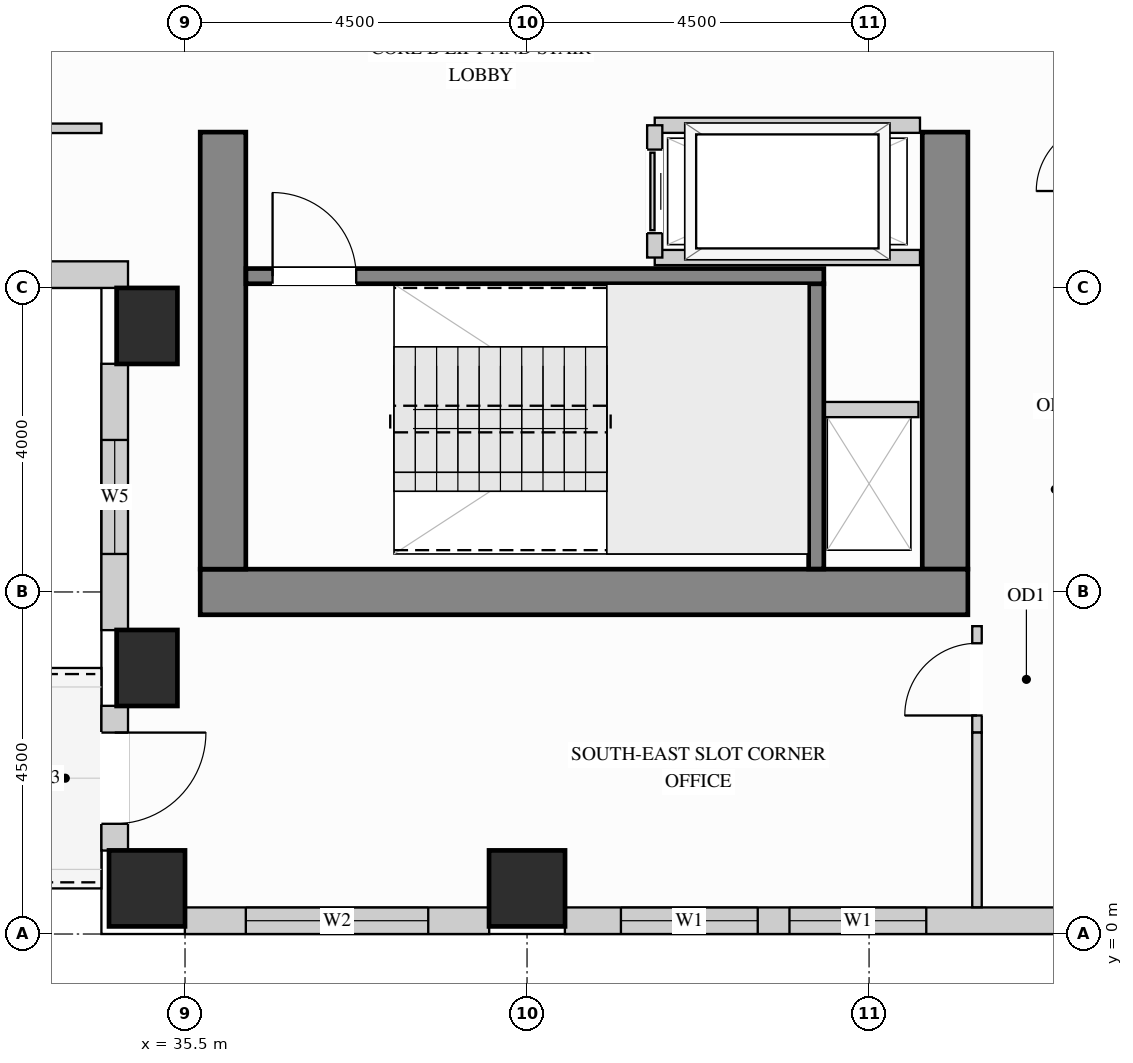
"""IFC4 building model, lengths in metres.
Left out: names, types, materials, properties, quantities, classifications, styles, units other than length and angle.
Written with IfcOpenShell. Run it as: python <this file> out.ifc"""

import sys

from ifc_helpers import new_model, si_unit, direction, frame, frame_2d, origin, origin_2d, place, context, subcontext, project, spatial, rectangle, extrude, source, transform, mapped, element, fill, save


model = new_model("IFC4")
c1 = context("Model", 3, precision=1e-05, world=origin(), true_north=direction((0.0, 1.0)))
c2 = subcontext(c1, "Body", "Model", "MODEL_VIEW")
j1 = project(units=[si_unit("LENGTHUNIT", "METRE"), si_unit("PLANEANGLEUNIT", "RADIAN")], contexts=[c1])
p1 = place(None, origin())
s1 = spatial("IfcSite", under=j1, at=p1, CompositionType="ELEMENT")
p2 = place(p1, origin())
s2 = spatial("IfcBuilding", under=s1, at=p2, CompositionType="ELEMENT")
p3 = place(p2, frame((0.0, 0.0, 193.5)))
s3 = spatial("IfcBuildingStorey", under=s2, at=p3, CompositionType="ELEMENT", Elevation=193.5)
m1 = source(origin(), c2, "Body", "SweptSolid", [
    extrude(rectangle(XDim=0.8, YDim=1.0, at=origin_2d()), origin(), (0.0, 0.0, 1.0), 3.4),
])
for number, where, z_axis, x_axis in (
    (1, (35.0, 3.5, 0.0), (0.0, 0.0, 1.0), (1.0, 0.0, 0.0)),
    (2, (35.0, 8.0, 0.0), (0.0, 0.0, 1.0), (1.0, 0.0, 0.0)),
):
    element("IfcColumn", number, at=place(p3, frame(where, z_axis=z_axis, x_axis=x_axis)), inside=s3, PredefinedType="COLUMN", context=c2, shape_type="MappedRepresentation", body=[
        mapped(m1, transform((0.0, 0.0, 0.0), x_axis=(1.0, 0.0, 0.0), y_axis=(0.0, 1.0, 0.0), z_axis=(0.0, 0.0, 1.0))),
    ])
m2 = source(origin(), c2, "Body", "SweptSolid", [
    extrude(rectangle(XDim=1.0, YDim=1.0, at=origin_2d()), origin(), (0.0, 0.0, 1.0), 3.4),
])
for number, where, z_axis, x_axis in (
    (3, (35.0, 0.6, 0.0), (0.0, 0.0, 1.0), (1.0, 0.0, 0.0)),
    (4, (40.0, 0.6, 0.0), (0.0, 0.0, 1.0), (1.0, 0.0, 0.0)),
):
    element("IfcColumn", number, at=place(p3, frame(where, z_axis=z_axis, x_axis=x_axis)), inside=s3, PredefinedType="COLUMN", context=c2, shape_type="MappedRepresentation", body=[
        mapped(m2, transform((0.0, 0.0, 0.0), x_axis=(1.0, 0.0, 0.0), y_axis=(0.0, 1.0, 0.0), z_axis=(0.0, 0.0, 1.0))),
    ])
m3 = source(origin(), c2, "Body", "SweptSolid", [
    extrude(rectangle(XDim=5.75, YDim=0.6, at=frame_2d((2.875, 0.0))), origin(), (0.0, 0.0, 1.0), 3.4),
])
p4 = place(p3, frame((45.5, 4.8, 0.0), z_axis=(0.0, 0.0, 1.0), x_axis=(0.0, 1.0, 0.0)))
e5 = element("IfcWall", 5, at=p4, inside=s3, PredefinedType="SHEAR", context=c2, shape_type="MappedRepresentation", body=[
    mapped(m3, transform((0.0, 0.0, 0.0), x_axis=(1.0, 0.0, 0.0), y_axis=(0.0, 1.0, 0.0), z_axis=(0.0, 0.0, 1.0))),
])
m4 = source(origin(), c2, "Body", "SweptSolid", [
    extrude(rectangle(XDim=10.1, YDim=0.6, at=frame_2d((5.05, 0.0))), origin(), (0.0, 0.0, 1.0), 3.4),
])
p5 = place(p3, frame((35.7, 4.5, 0.0), z_axis=(0.0, 0.0, 1.0), x_axis=(1.0, 0.0, 0.0)))
e6 = element("IfcWall", 6, at=p5, inside=s3, PredefinedType="SHEAR", context=c2, shape_type="MappedRepresentation", body=[
    mapped(m4, transform((0.0, 0.0, 0.0), x_axis=(1.0, 0.0, 0.0), y_axis=(0.0, 1.0, 0.0), z_axis=(0.0, 0.0, 1.0))),
])
p6 = place(p3, frame((36.0, 4.8, 0.0), z_axis=(0.0, 0.0, 1.0), x_axis=(0.0, 1.0, 0.0)))
e7 = element("IfcWall", 7, at=p6, inside=s3, PredefinedType="SHEAR", context=c2, shape_type="MappedRepresentation", body=[
    mapped(m3, transform((0.0, 0.0, 0.0), x_axis=(1.0, 0.0, 0.0), y_axis=(0.0, 1.0, 0.0), z_axis=(0.0, 0.0, 1.0))),
])
p7 = place(p3, frame((30.898, 8.675, 0.0), z_axis=(0.0, 0.0, 1.0), x_axis=(1.0, 0.0, 0.0)))
e8 = element("IfcWall", 8, at=p7, inside=s3, PredefinedType="SOLIDWALL", context=c2, shape_type="SweptSolid", body=[
    extrude(rectangle(XDim=3.852, YDim=0.35, at=frame_2d((1.926, 0.0))), origin(), (0.0, 0.0, 1.0), 3.385),
])
p8 = place(p7, frame((1.176, 0.0, 0.78)))
e9 = element("IfcOpeningElement", 9, at=p8, cuts=e8, PredefinedType="OPENING", context=c2, shape_type="SweptSolid", body=[
    extrude(rectangle(XDim=1.5, YDim=2.0, at=frame_2d((0.75, 1.0))), frame((0.0, 0.185, 0.0), z_axis=(0.0, -1.0, 0.0), x_axis=(1.0, 0.0, 0.0)), (0.0, 0.0, 1.0), 0.37),
])
p9 = place(p3, frame((34.575, 7.502, 0.0), z_axis=(0.0, 0.0, 1.0), x_axis=(0.0, -1.0, 0.0)))
e10 = element("IfcWall", 10, at=p9, inside=s3, PredefinedType="SOLIDWALL", context=c2, shape_type="SweptSolid", body=[
    extrude(rectangle(XDim=3.504, YDim=0.35, at=frame_2d((1.752, 0.0))), origin(), (0.0, 0.0, 1.0), 2.612),
])
p10 = place(p9, frame((1.002, 0.0, 0.78)))
e11 = element("IfcOpeningElement", 11, at=p10, cuts=e10, PredefinedType="OPENING", context=c2, shape_type="SweptSolid", body=[
    extrude(rectangle(XDim=1.5, YDim=1.652, at=frame_2d((0.75, 0.826))), frame((0.0, 0.185, 0.0), z_axis=(0.0, -1.0, 0.0), x_axis=(1.0, 0.0, 0.0)), (0.0, 0.0, 1.0), 0.37),
])
p11 = place(p3, frame((34.575, 3.002, 0.0), z_axis=(0.0, 0.0, 1.0), x_axis=(0.0, -1.0, 0.0)))
e12 = element("IfcWall", 12, at=p11, inside=s3, PredefinedType="SOLIDWALL", context=c2, shape_type="SweptSolid", body=[
    extrude(rectangle(XDim=1.904, YDim=0.35, at=frame_2d((0.952, 0.0))), origin(), (0.0, 0.0, 1.0), 2.612),
])
p12 = place(p11, frame((0.352, 0.0, 0.0)))
e13 = element("IfcOpeningElement", 13, at=p12, cuts=e12, PredefinedType="OPENING", context=c2, shape_type="SweptSolid", body=[
    extrude(rectangle(XDim=1.2, YDim=2.15, at=frame_2d((0.6, 1.075))), frame((0.0, 0.185, 0.0), z_axis=(0.0, -1.0, 0.0), x_axis=(1.0, 0.0, 0.0)), (0.0, 0.0, 1.0), 0.37),
])
p13 = place(p3, frame((35.498, 0.175, 0.0), z_axis=(0.0, 0.0, 1.0), x_axis=(1.0, 0.0, 0.0)))
e14 = element("IfcWall", 14, at=p13, inside=s3, PredefinedType="SOLIDWALL", context=c2, shape_type="SweptSolid", body=[
    extrude(rectangle(XDim=4.004, YDim=0.35, at=frame_2d((2.002, 0.0))), origin(), (0.0, 0.0, 1.0), 2.612),
])
p14 = place(p13, frame((0.802, 0.0, 0.78)))
e15 = element("IfcOpeningElement", 15, at=p14, cuts=e14, PredefinedType="OPENING", context=c2, shape_type="SweptSolid", body=[
    extrude(rectangle(XDim=2.4, YDim=1.652, at=frame_2d((1.2, 0.826))), frame((0.0, 0.185, 0.0), z_axis=(0.0, -1.0, 0.0), x_axis=(1.0, 0.0, 0.0)), (0.0, 0.0, 1.0), 0.37),
])
p15 = place(p3, frame((40.498, 0.175, 0.0), z_axis=(0.0, 0.0, 1.0), x_axis=(1.0, 0.0, 0.0)))
e16 = element("IfcWall", 16, at=p15, inside=s3, PredefinedType="SOLIDWALL", context=c2, shape_type="SweptSolid", body=[
    extrude(rectangle(XDim=6.604, YDim=0.35, at=frame_2d((3.302, 0.0))), origin(), (0.0, 0.0, 1.0), 2.612),
])
p16 = place(p15, frame((0.737, 0.0, 0.78)))
e17 = element("IfcOpeningElement", 17, at=p16, cuts=e16, PredefinedType="OPENING", context=c2, shape_type="SweptSolid", body=[
    extrude(rectangle(XDim=1.8, YDim=1.652, at=frame_2d((0.9, 0.826))), frame((0.0, 0.185, 0.0), z_axis=(0.0, -1.0, 0.0), x_axis=(1.0, 0.0, 0.0)), (0.0, 0.0, 1.0), 0.37),
])
p17 = place(p15, frame((2.955, 0.0, 0.78)))
e18 = element("IfcOpeningElement", 18, at=p17, cuts=e16, PredefinedType="OPENING", context=c2, shape_type="SweptSolid", body=[
    extrude(rectangle(XDim=1.8, YDim=1.652, at=frame_2d((0.9, 0.826))), frame((0.0, 0.185, 0.0), z_axis=(0.0, -1.0, 0.0), x_axis=(1.0, 0.0, 0.0)), (0.0, 0.0, 1.0), 0.37),
])
p18 = place(p3, frame((45.92, 2.65, 0.0), z_axis=(0.0, 0.0, 1.0), x_axis=(0.0, 1.0, 0.0)))
e19 = element("IfcWall", 19, at=p18, inside=s3, PredefinedType="PARTITIONING", context=c2, shape_type="SweptSolid", body=[
    extrude(rectangle(XDim=1.4, YDim=0.125, at=frame_2d((0.7, 0.0))), origin(), (0.0, 0.0, 1.0), 3.385),
])
p19 = place(p18, frame((0.225, 0.0, 0.0)))
e20 = element("IfcOpeningElement", 20, at=p19, cuts=e19, PredefinedType="OPENING", context=c2, shape_type="SweptSolid", body=[
    extrude(rectangle(XDim=0.95, YDim=2.15, at=frame_2d((0.475, 1.075))), frame((0.0, 0.073, 0.0), z_axis=(0.0, -1.0, 0.0), x_axis=(1.0, 0.0, 0.0)), (0.0, 0.0, 1.0), 0.145),
])
m5 = source(origin(), c2, "Body", "SweptSolid", [
    extrude(rectangle(XDim=2.298, YDim=0.125, at=frame_2d((1.149, 0.0))), origin(), (0.0, 0.0, 1.0), 3.385),
])
p20 = place(p3, frame((45.92, 0.352, 0.0), z_axis=(0.0, 0.0, 1.0), x_axis=(0.0, 1.0, 0.0)))
e21 = element("IfcWall", 21, at=p20, inside=s3, PredefinedType="PARTITIONING", context=c2, shape_type="MappedRepresentation", body=[
    mapped(m5, transform((0.0, 0.0, 0.0), x_axis=(1.0, 0.0, 0.0), y_axis=(0.0, 1.0, 0.0), z_axis=(0.0, 0.0, 1.0))),
])
p21 = place(p3, frame((19.5, 10.6, 0.0), z_axis=(0.0, 0.0, 1.0), x_axis=(1.0, 0.0, 0.0)))
e22 = element("IfcWall", 22, at=p21, inside=s3, PredefinedType="PARTITIONING", context=c2, shape_type="SweptSolid", body=[
    extrude(rectangle(XDim=14.9, YDim=0.125, at=frame_2d((7.45, 0.0))), origin(), (0.0, 0.0, 1.0), 3.385),
])
p22 = place(p21, frame((6.975, 0.0, 0.0)))
e23 = element("IfcOpeningElement", 23, at=p22, cuts=e22, PredefinedType="OPENING", context=c2, shape_type="SweptSolid", body=[
    extrude(rectangle(XDim=0.95, YDim=2.15, at=frame_2d((0.475, 1.075))), frame((0.0, 0.073, 0.0), z_axis=(0.0, -1.0, 0.0), x_axis=(1.0, 0.0, 0.0)), (0.0, 0.0, 1.0), 0.145),
])
m6 = source(origin(), c2, "Body", "SweptSolid", [
    extrude(rectangle(XDim=1.3, YDim=0.2, at=frame_2d((0.65, 0.0))), origin(), (0.0, 0.0, 1.0), 3.385),
])
p23 = place(p3, frame((43.85, 6.9, 0.0), z_axis=(0.0, 0.0, 1.0), x_axis=(1.0, 0.0, 0.0)))
e24 = element("IfcWall", 24, at=p23, inside=s3, PredefinedType="PARTITIONING", context=c2, shape_type="MappedRepresentation", body=[
    mapped(m6, transform((0.0, 0.0, 0.0), x_axis=(1.0, 0.0, 0.0), y_axis=(0.0, 1.0, 0.0), z_axis=(0.0, 0.0, 1.0))),
])
m7 = source(origin(), c2, "Body", "SweptSolid", [
    extrude(rectangle(XDim=3.49, YDim=0.2, at=frame_2d((1.745, 0.0))), origin(), (0.0, 0.0, 1.0), 3.385),
])
for number, where, z_axis, x_axis in (
    (25, (41.68, 10.64, 0.0), (0.0, 0.0, 1.0), (1.0, 0.0, 0.0)),
    (26, (41.68, 8.9, 0.0), (0.0, 0.0, 1.0), (1.0, 0.0, 0.0)),
):
    element("IfcWall", number, at=place(p3, frame(where, z_axis=z_axis, x_axis=x_axis)), inside=s3, PredefinedType="PARTITIONING", context=c2, shape_type="MappedRepresentation", body=[
        mapped(m7, transform((0.0, 0.0, 0.0), x_axis=(1.0, 0.0, 0.0), y_axis=(0.0, 1.0, 0.0), z_axis=(0.0, 0.0, 1.0))),
    ])
p24 = place(p3, frame((41.68, 8.9, 0.0), z_axis=(0.0, 0.0, 1.0), x_axis=(0.0, 1.0, 0.0)))
e27 = element("IfcWall", 27, at=p24, inside=s3, PredefinedType="PARTITIONING", context=c2, shape_type="SweptSolid", body=[
    extrude(rectangle(XDim=1.74, YDim=0.2, at=frame_2d((0.87, 0.0))), origin(), (0.0, 0.0, 1.0), 3.385),
])
p25 = place(p24, frame((0.32, 0.0, 0.0)))
e28 = element("IfcOpeningElement", 28, at=p25, cuts=e27, PredefinedType="OPENING", context=c2, shape_type="SweptSolid", body=[
    extrude(rectangle(XDim=1.1, YDim=2.2, at=frame_2d((0.55, 1.1))), frame((0.0, 0.11, 0.0), z_axis=(0.0, -1.0, 0.0), x_axis=(1.0, 0.0, 0.0)), (0.0, 0.0, 1.0), 0.22),
])
m8 = source(origin(), c2, "Body", "SweptSolid", [
    extrude(rectangle(XDim=3.753, YDim=0.2, at=frame_2d((1.876, 0.0))), origin(), (0.0, 0.0, 1.0), 3.4),
])
p26 = place(p3, frame((43.805, 4.802, 0.0), z_axis=(0.0, 0.0, 1.0), x_axis=(0.0, 1.0, 0.0)))
e29 = element("IfcWall", 29, at=p26, inside=s3, PredefinedType="SHEAR", context=c2, shape_type="MappedRepresentation", body=[
    mapped(m8, transform((0.0, 0.0, 0.0), x_axis=(1.0, 0.0, 0.0), y_axis=(0.0, 1.0, 0.0), z_axis=(0.0, 0.0, 1.0))),
])
p27 = place(p3, frame((36.302, 8.655, 0.0), z_axis=(0.0, 0.0, 1.0), x_axis=(1.0, 0.0, 0.0)))
e30 = element("IfcWall", 30, at=p27, inside=s3, PredefinedType="SHEAR", context=c2, shape_type="SweptSolid", body=[
    extrude(rectangle(XDim=7.603, YDim=0.2, at=frame_2d((3.802, 0.0))), origin(), (0.0, 0.0, 1.0), 3.4),
])
p28 = place(p27, frame((0.35, 0.0, 0.0)))
e31 = element("IfcOpeningElement", 31, at=p28, cuts=e30, PredefinedType="OPENING", context=c2, shape_type="SweptSolid", body=[
    extrude(rectangle(XDim=1.1, YDim=2.15, at=frame_2d((0.55, 1.075))), frame((0.0, 0.11, 0.0), z_axis=(0.0, -1.0, 0.0), x_axis=(1.0, 0.0, 0.0)), (0.0, 0.0, 1.0), 0.22),
])
m9 = source(origin(), c2, "Body", "SweptSolid", [
    extrude(rectangle(XDim=1.2, YDim=2.15, at=frame_2d((0.6, 1.075))), frame((0.0, 0.025, 0.0), z_axis=(0.0, -1.0, 0.0), x_axis=(1.0, 0.0, 0.0)), (0.0, 0.0, 1.0), 0.05),
])
p29 = place(p12, frame((1.2, 0.0, 0.0), z_axis=(0.0, 0.0, 1.0), x_axis=(-1.0, 0.0, 0.0)))
e32 = element("IfcDoor", 32, at=p29, inside=s3, OperationType="SINGLE_SWING_LEFT", PredefinedType="DOOR", context=c2, shape_type="MappedRepresentation", body=[
    mapped(m9, transform((0.0, 0.0, 0.0), x_axis=(1.0, 0.0, 0.0), y_axis=(0.0, 1.0, 0.0), z_axis=(0.0, 0.0, 1.0))),
])
fill(e13, e32)
m10 = source(origin(), c2, "Body", "SweptSolid", [
    extrude(rectangle(XDim=1.1, YDim=2.2, at=frame_2d((0.55, 1.1))), frame((0.0, 0.025, 0.0), z_axis=(0.0, -1.0, 0.0), x_axis=(1.0, 0.0, 0.0)), (0.0, 0.0, 1.0), 0.05),
])
p30 = place(p25, origin())
e33 = element("IfcDoor", 33, at=p30, inside=s3, OperationType="SLIDING_TO_LEFT", PredefinedType="DOOR", context=c2, shape_type="MappedRepresentation", body=[
    mapped(m10, transform((0.0, 0.0, 0.0), x_axis=(1.0, 0.0, 0.0), y_axis=(0.0, 1.0, 0.0), z_axis=(0.0, 0.0, 1.0))),
])
fill(e28, e33)
m11 = source(origin(), c2, "Body", "SweptSolid", [
    extrude(rectangle(XDim=0.95, YDim=2.15, at=frame_2d((0.475, 1.075))), frame((0.0, 0.025, 0.0), z_axis=(0.0, -1.0, 0.0), x_axis=(1.0, 0.0, 0.0)), (0.0, 0.0, 1.0), 0.05),
])
p31 = place(p19, origin())
e34 = element("IfcDoor", 34, at=p31, inside=s3, OperationType="SINGLE_SWING_LEFT", PredefinedType="DOOR", context=c2, shape_type="MappedRepresentation", body=[
    mapped(m11, transform((0.0, 0.0, 0.0), x_axis=(1.0, 0.0, 0.0), y_axis=(0.0, 1.0, 0.0), z_axis=(0.0, 0.0, 1.0))),
])
fill(e20, e34)
m12 = source(origin(), c2, "Body", "SweptSolid", [
    extrude(rectangle(XDim=1.1, YDim=2.15, at=frame_2d((0.55, 1.075))), frame((0.0, 0.025, 0.0), z_axis=(0.0, -1.0, 0.0), x_axis=(1.0, 0.0, 0.0)), (0.0, 0.0, 1.0), 0.05),
])
p32 = place(p28, origin())
e35 = element("IfcDoor", 35, at=p32, inside=s3, OperationType="SINGLE_SWING_LEFT", PredefinedType="DOOR", context=c2, shape_type="MappedRepresentation", body=[
    mapped(m12, transform((0.0, 0.0, 0.0), x_axis=(1.0, 0.0, 0.0), y_axis=(0.0, 1.0, 0.0), z_axis=(0.0, 0.0, 1.0))),
])
fill(e31, e35)
m13 = source(origin(), c2, "Body", "SweptSolid", [
    extrude(rectangle(XDim=1.8, YDim=1.652, at=frame_2d((0.9, 0.826))), frame((0.0, 0.03, 0.0), z_axis=(0.0, -1.0, 0.0), x_axis=(1.0, 0.0, 0.0)), (0.0, 0.0, 1.0), 0.06),
])
p33 = place(p16, origin())
e36 = element("IfcWindow", 36, at=p33, inside=s3, PartitioningType="SINGLE_PANEL", PredefinedType="WINDOW", context=c2, shape_type="MappedRepresentation", body=[
    mapped(m13, transform((0.0, 0.0, 0.0), x_axis=(1.0, 0.0, 0.0), y_axis=(0.0, 1.0, 0.0), z_axis=(0.0, 0.0, 1.0))),
])
fill(e17, e36)
p34 = place(p17, origin())
e37 = element("IfcWindow", 37, at=p34, inside=s3, PartitioningType="SINGLE_PANEL", PredefinedType="WINDOW", context=c2, shape_type="MappedRepresentation", body=[
    mapped(m13, transform((0.0, 0.0, 0.0), x_axis=(1.0, 0.0, 0.0), y_axis=(0.0, 1.0, 0.0), z_axis=(0.0, 0.0, 1.0))),
])
fill(e18, e37)
m14 = source(origin(), c2, "Body", "SweptSolid", [
    extrude(rectangle(XDim=2.4, YDim=1.652, at=frame_2d((1.2, 0.826))), frame((0.0, 0.03, 0.0), z_axis=(0.0, -1.0, 0.0), x_axis=(1.0, 0.0, 0.0)), (0.0, 0.0, 1.0), 0.06),
])
p35 = place(p14, origin())
e38 = element("IfcWindow", 38, at=p35, inside=s3, PartitioningType="SINGLE_PANEL", PredefinedType="WINDOW", context=c2, shape_type="MappedRepresentation", body=[
    mapped(m14, transform((0.0, 0.0, 0.0), x_axis=(1.0, 0.0, 0.0), y_axis=(0.0, 1.0, 0.0), z_axis=(0.0, 0.0, 1.0))),
])
fill(e15, e38)
m15 = source(origin(), c2, "Body", "SweptSolid", [
    extrude(rectangle(XDim=1.5, YDim=1.652, at=frame_2d((0.75, 0.826))), frame((0.0, 0.03, 0.0), z_axis=(0.0, -1.0, 0.0), x_axis=(1.0, 0.0, 0.0)), (0.0, 0.0, 1.0), 0.06),
])
p36 = place(p10, origin())
e39 = element("IfcWindow", 39, at=p36, inside=s3, PartitioningType="SINGLE_PANEL", PredefinedType="WINDOW", context=c2, shape_type="MappedRepresentation", body=[
    mapped(m15, transform((0.0, 0.0, 0.0), x_axis=(1.0, 0.0, 0.0), y_axis=(0.0, 1.0, 0.0), z_axis=(0.0, 0.0, 1.0))),
])
fill(e11, e39)
save(model, sys.argv[1])
